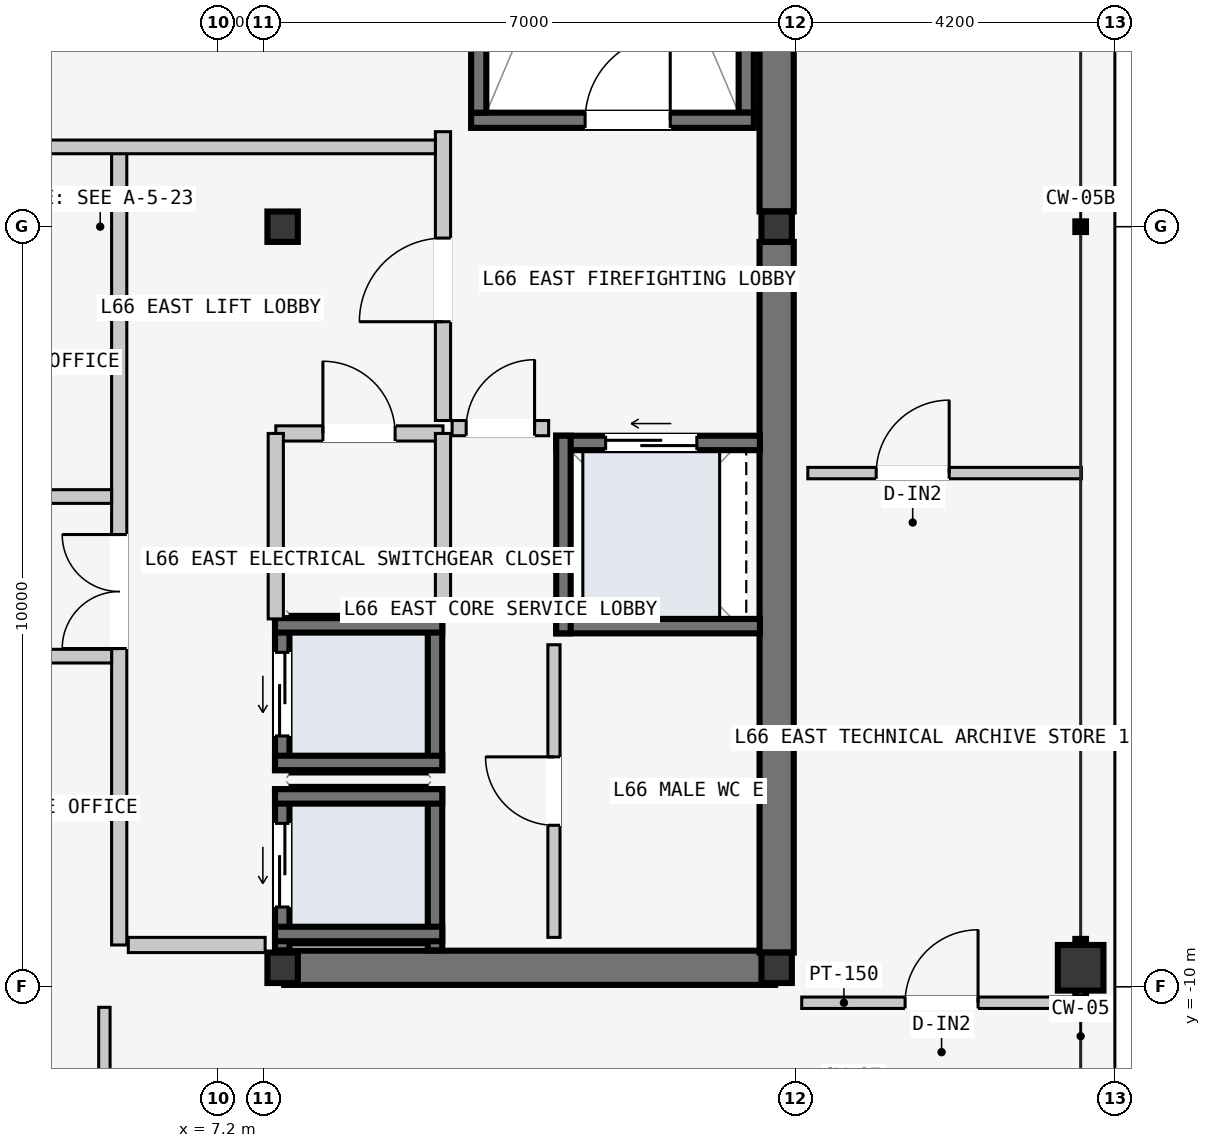
"""IFC4 building model, lengths in metres.
Left out: names, types, materials, properties, quantities, classifications, styles, units other than length and angle.
Written with IfcOpenShell. Run it as: python <this file> out.ifc"""

import sys

from ifc_helpers import new_model, si_unit, direction, frame, frame_2d, origin, origin_2d, place, context, subcontext, project, spatial, rectangle, hollow_rectangle, i_section, extrude, element, fill, save


model = new_model("IFC4")
c1 = context("Model", 3, precision=1e-05, world=origin(), true_north=direction((0.0, 1.0)))
c2 = subcontext(c1, "Body", "Model", "MODEL_VIEW")
j1 = project(units=[si_unit("LENGTHUNIT", "METRE"), si_unit("PLANEANGLEUNIT", "RADIAN")], contexts=[c1])
p1 = place(None, origin())
s1 = spatial("IfcSite", under=j1, at=p1, CompositionType="ELEMENT")
p2 = place(p1, origin())
s2 = spatial("IfcBuilding", under=s1, at=p2, CompositionType="ELEMENT")
p3 = place(p2, frame((0.0, 0.0, 250.8)))
s3 = spatial("IfcBuildingStorey", under=s2, at=p3, CompositionType="ELEMENT", Elevation=250.8)
p4 = place(p3, frame((8.07, -9.75, -0.2), z_axis=(0.0, 0.0, 1.0), x_axis=(1.0, 0.0, 0.0)))
e1 = element("IfcWall", 1, at=p4, inside=s3, PredefinedType="SHEAR", context=c2, shape_type="SweptSolid", body=[
    extrude(rectangle(XDim=6.46, YDim=0.45, at=frame_2d((3.23, 0.0))), origin(), (0.0, 0.0, 1.0), 3.6),
])
for number, where, z_axis, x_axis in (
    (2, (14.55, -9.55, -0.2), (0.0, 0.0, 1.0), (0.0, 1.0, 0.0)),
    (3, (14.55, 0.2, -0.2), (0.0, 0.0, 1.0), (0.0, 1.0, 0.0)),
):
    element("IfcWall", number, at=place(p3, frame(where, z_axis=z_axis, x_axis=x_axis)), inside=s3, PredefinedType="SHEAR", context=c2, shape_type="SweptSolid", body=[
        extrude(rectangle(XDim=9.35, YDim=0.45, at=frame_2d((4.675, 0.0))), origin(), (0.0, 0.0, 1.0), 3.6),
    ])
p5 = place(p3, frame((14.15, 1.5, -0.2), z_axis=(0.0, 0.0, 1.0), x_axis=(0.0, 1.0, 0.0)))
e4 = element("IfcWall", 4, at=p5, inside=s3, PredefinedType="SOLIDWALL", context=c2, shape_type="SweptSolid", body=[
    extrude(rectangle(XDim=7.8, YDim=0.2, at=frame_2d((3.9, 0.0))), origin(), (0.0, 0.0, 1.0), 3.6),
])
p6 = place(p3, frame((10.53, 1.4, -0.2), z_axis=(0.0, 0.0, 1.0), x_axis=(1.0, 0.0, 0.0)))
e5 = element("IfcWall", 5, at=p6, inside=s3, PredefinedType="SOLIDWALL", context=c2, shape_type="SweptSolid", body=[
    extrude(rectangle(XDim=3.72, YDim=0.2, at=frame_2d((1.86, 0.0))), origin(), (0.0, 0.0, 1.0), 3.6),
])
p7 = place(p6, frame((1.5, 0.0, 0.2)))
e6 = element("IfcOpeningElement", 6, at=p7, cuts=e5, PredefinedType="OPENING", context=c2, shape_type="SweptSolid", body=[
    extrude(rectangle(XDim=1.12, YDim=2.18, at=frame_2d((0.56, 1.09))), frame((0.0, 0.11, 0.0), z_axis=(0.0, -1.0, 0.0), x_axis=(1.0, 0.0, 0.0)), (0.0, 0.0, 1.0), 0.22),
])
p8 = place(p3, frame((10.63, 1.5, -0.2), z_axis=(0.0, 0.0, 1.0), x_axis=(0.0, 1.0, 0.0)))
e7 = element("IfcWall", 7, at=p8, inside=s3, PredefinedType="SOLIDWALL", context=c2, shape_type="SweptSolid", body=[
    extrude(rectangle(XDim=7.8, YDim=0.2, at=frame_2d((3.9, 0.0))), origin(), (0.0, 0.0, 1.0), 3.6),
])
for number, where, z_axis, x_axis in (
    (8, (8.05, -9.75, 0.0), (0.0, 0.0, 1.0), (1.0, 0.0, 0.0)),
    (9, (8.05, 0.0, 0.0), (0.0, 0.0, 1.0), (1.0, 0.0, 0.0)),
    (10, (14.55, -9.75, 0.0), (0.0, 0.0, 1.0), (1.0, 0.0, 0.0)),
    (11, (14.55, 0.0, 0.0), (0.0, 0.0, 1.0), (1.0, 0.0, 0.0)),
):
    element("IfcColumn", number, at=place(p3, frame(where, z_axis=z_axis, x_axis=x_axis)), inside=s3, PredefinedType="COLUMN", context=c2, shape_type="SweptSolid", body=[
        extrude(i_section(OverallWidth=0.4, OverallDepth=0.4, WebThickness=0.013, FlangeThickness=0.021, at=origin_2d()), origin(), (0.0, 0.0, 1.0), 3.6),
    ])
p9 = place(p3, frame((18.55, -9.75, 0.0), z_axis=(0.0, 0.0, 1.0), x_axis=(0.0, 1.0, 0.0)))
e12 = element("IfcColumn", 12, at=p9, inside=s3, PredefinedType="COLUMN", context=c2, shape_type="SweptSolid", body=[
    extrude(hollow_rectangle(XDim=0.6, YDim=0.6, WallThickness=0.025, at=origin_2d()), origin(), (0.0, 0.0, 1.0), 3.6),
])
p10 = place(p3, frame((8.045, -9.52, -0.2), z_axis=(0.0, 0.0, 1.0), x_axis=(0.0, 1.0, 0.0)))
e13 = element("IfcWall", 13, at=p10, inside=s3, PredefinedType="SOLIDWALL", context=c2, shape_type="SweptSolid", body=[
    extrude(rectangle(XDim=2.12, YDim=0.19, at=frame_2d((1.06, 0.0))), origin(), (0.0, 0.0, 1.0), 3.6),
])
p11 = place(p10, frame((0.57, 0.0, 0.2)))
e14 = element("IfcOpeningElement", 14, at=p11, cuts=e13, PredefinedType="OPENING", context=c2, shape_type="SweptSolid", body=[
    extrude(rectangle(XDim=1.1, YDim=2.2, at=frame_2d((0.55, 1.1))), frame((0.0, 0.105, 0.0), z_axis=(0.0, -1.0, 0.0), x_axis=(1.0, 0.0, 0.0)), (0.0, 0.0, 1.0), 0.21),
])
p12 = place(p3, frame((10.055, -9.52, -0.2), z_axis=(0.0, 0.0, 1.0), x_axis=(0.0, 1.0, 0.0)))
e15 = element("IfcWall", 15, at=p12, inside=s3, PredefinedType="SOLIDWALL", context=c2, shape_type="SweptSolid", body=[
    extrude(rectangle(XDim=2.12, YDim=0.19, at=frame_2d((1.06, 0.0))), origin(), (0.0, 0.0, 1.0), 3.6),
])
for number, where, z_axis, x_axis in (
    (16, (7.95, -7.495, -0.2), (0.0, 0.0, 1.0), (1.0, 0.0, 0.0)),
    (17, (7.95, -9.305, -0.2), (0.0, 0.0, 1.0), (1.0, 0.0, 0.0)),
):
    element("IfcWall", number, at=place(p3, frame(where, z_axis=z_axis, x_axis=x_axis)), inside=s3, PredefinedType="SOLIDWALL", context=c2, shape_type="SweptSolid", body=[
        extrude(rectangle(XDim=2.2, YDim=0.19, at=frame_2d((1.1, 0.0))), origin(), (0.0, 0.0, 1.0), 3.6),
    ])
p13 = place(p3, frame((8.045, -7.15, -0.2), z_axis=(0.0, 0.0, 1.0), x_axis=(0.0, 1.0, 0.0)))
e18 = element("IfcWall", 18, at=p13, inside=s3, PredefinedType="SOLIDWALL", context=c2, shape_type="SweptSolid", body=[
    extrude(rectangle(XDim=2.0, YDim=0.19, at=frame_2d((1.0, 0.0))), origin(), (0.0, 0.0, 1.0), 3.6),
])
p14 = place(p13, frame((0.45, 0.0, 0.2)))
e19 = element("IfcOpeningElement", 19, at=p14, cuts=e18, PredefinedType="OPENING", context=c2, shape_type="SweptSolid", body=[
    extrude(rectangle(XDim=1.1, YDim=2.2, at=frame_2d((0.55, 1.1))), frame((0.0, 0.105, 0.0), z_axis=(0.0, -1.0, 0.0), x_axis=(1.0, 0.0, 0.0)), (0.0, 0.0, 1.0), 0.21),
])
p15 = place(p3, frame((10.055, -7.15, -0.2), z_axis=(0.0, 0.0, 1.0), x_axis=(0.0, 1.0, 0.0)))
e20 = element("IfcWall", 20, at=p15, inside=s3, PredefinedType="SOLIDWALL", context=c2, shape_type="SweptSolid", body=[
    extrude(rectangle(XDim=2.0, YDim=0.19, at=frame_2d((1.0, 0.0))), origin(), (0.0, 0.0, 1.0), 3.6),
])
for number, where, z_axis, x_axis in (
    (21, (7.95, -5.245, -0.2), (0.0, 0.0, 1.0), (1.0, 0.0, 0.0)),
    (22, (7.95, -7.055, -0.2), (0.0, 0.0, 1.0), (1.0, 0.0, 0.0)),
):
    element("IfcWall", number, at=place(p3, frame(where, z_axis=z_axis, x_axis=x_axis)), inside=s3, PredefinedType="SOLIDWALL", context=c2, shape_type="SweptSolid", body=[
        extrude(rectangle(XDim=2.2, YDim=0.19, at=frame_2d((1.1, 0.0))), origin(), (0.0, 0.0, 1.0), 3.6),
    ])
p16 = place(p3, frame((11.65, -2.845, -0.2), z_axis=(0.0, 0.0, 1.0), x_axis=(1.0, 0.0, 0.0)))
e23 = element("IfcWall", 23, at=p16, inside=s3, PredefinedType="SOLIDWALL", context=c2, shape_type="SweptSolid", body=[
    extrude(rectangle(XDim=2.68, YDim=0.19, at=frame_2d((1.34, 0.0))), origin(), (0.0, 0.0, 1.0), 3.6),
])
p17 = place(p16, frame((0.65, 0.0, 0.2)))
e24 = element("IfcOpeningElement", 24, at=p17, cuts=e23, PredefinedType="OPENING", context=c2, shape_type="SweptSolid", body=[
    extrude(rectangle(XDim=1.2, YDim=2.2, at=frame_2d((0.6, 1.1))), frame((0.0, 0.105, 0.0), z_axis=(0.0, -1.0, 0.0), x_axis=(1.0, 0.0, 0.0)), (0.0, 0.0, 1.0), 0.21),
])
p18 = place(p3, frame((11.65, -5.255, -0.2), z_axis=(0.0, 0.0, 1.0), x_axis=(1.0, 0.0, 0.0)))
e25 = element("IfcWall", 25, at=p18, inside=s3, PredefinedType="SOLIDWALL", context=c2, shape_type="SweptSolid", body=[
    extrude(rectangle(XDim=2.68, YDim=0.19, at=frame_2d((1.34, 0.0))), origin(), (0.0, 0.0, 1.0), 3.6),
])
p19 = place(p3, frame((11.745, -5.35, -0.2), z_axis=(0.0, 0.0, 1.0), x_axis=(0.0, 1.0, 0.0)))
e26 = element("IfcWall", 26, at=p19, inside=s3, PredefinedType="SOLIDWALL", context=c2, shape_type="SweptSolid", body=[
    extrude(rectangle(XDim=2.6, YDim=0.19, at=frame_2d((1.3, 0.0))), origin(), (0.0, 0.0, 1.0), 3.6),
])
p20 = place(p3, frame((5.9, -9.45, 0.0), z_axis=(0.0, 0.0, 1.0), x_axis=(0.0, 1.0, 0.0)))
e27 = element("IfcWall", 27, at=p20, inside=s3, PredefinedType="PARTITIONING", context=c2, shape_type="SweptSolid", body=[
    extrude(rectangle(XDim=10.5, YDim=0.2, at=frame_2d((5.25, 0.0))), origin(), (0.0, 0.0, 1.0), 3.4),
])
p21 = place(p20, frame((3.9, 0.0, 0.0)))
e28 = element("IfcOpeningElement", 28, at=p21, cuts=e27, PredefinedType="OPENING", context=c2, shape_type="SweptSolid", body=[
    extrude(rectangle(XDim=1.5, YDim=2.2, at=frame_2d((0.75, 1.1))), frame((0.0, 0.11, 0.0), z_axis=(0.0, -1.0, 0.0), x_axis=(1.0, 0.0, 0.0)), (0.0, 0.0, 1.0), 0.22),
])
p22 = place(p3, frame((6.02, -9.45, 0.0), z_axis=(0.0, 0.0, 1.0), x_axis=(1.0, 0.0, 0.0)))
e29 = element("IfcWall", 29, at=p22, inside=s3, PredefinedType="PARTITIONING", context=c2, shape_type="SweptSolid", body=[
    extrude(rectangle(XDim=1.8, YDim=0.2, at=frame_2d((0.9, 0.0))), origin(), (0.0, 0.0, 1.0), 3.4),
])
p23 = place(p3, frame((10.16, -2.55, 0.0), z_axis=(0.0, 0.0, 1.0), x_axis=(0.0, 1.0, 0.0)))
e30 = element("IfcWall", 30, at=p23, inside=s3, PredefinedType="PARTITIONING", context=c2, shape_type="SweptSolid", body=[
    extrude(rectangle(XDim=3.8, YDim=0.2, at=frame_2d((1.9, 0.0))), origin(), (0.0, 0.0, 1.0), 3.4),
])
p24 = place(p23, frame((1.3, 0.0, 0.0)))
e31 = element("IfcOpeningElement", 31, at=p24, cuts=e30, PredefinedType="OPENING", context=c2, shape_type="SweptSolid", body=[
    extrude(rectangle(XDim=1.1, YDim=2.15, at=frame_2d((0.55, 1.075))), frame((0.0, 0.11, 0.0), z_axis=(0.0, -1.0, 0.0), x_axis=(1.0, 0.0, 0.0)), (0.0, 0.0, 1.0), 0.22),
])
p25 = place(p3, frame((10.28, -2.65, 0.0), z_axis=(0.0, 0.0, 1.0), x_axis=(1.0, 0.0, 0.0)))
e32 = element("IfcWall", 32, at=p25, inside=s3, PredefinedType="PARTITIONING", context=c2, shape_type="SweptSolid", body=[
    extrude(rectangle(XDim=1.27, YDim=0.2, at=frame_2d((0.635, 0.0))), origin(), (0.0, 0.0, 1.0), 3.4),
])
p26 = place(p25, frame((0.185, 0.0, 0.0)))
e33 = element("IfcOpeningElement", 33, at=p26, cuts=e32, PredefinedType="OPENING", context=c2, shape_type="SweptSolid", body=[
    extrude(rectangle(XDim=0.9, YDim=2.15, at=frame_2d((0.45, 1.075))), frame((0.0, 0.11, 0.0), z_axis=(0.0, -1.0, 0.0), x_axis=(1.0, 0.0, 0.0)), (0.0, 0.0, 1.0), 0.22),
])
p27 = place(p3, frame((7.96, -2.72, 0.0), z_axis=(0.0, 0.0, 1.0), x_axis=(1.0, 0.0, 0.0)))
e34 = element("IfcWall", 34, at=p27, inside=s3, PredefinedType="PARTITIONING", context=c2, shape_type="SweptSolid", body=[
    extrude(rectangle(XDim=2.2, YDim=0.2, at=frame_2d((1.1, 0.0))), origin(), (0.0, 0.0, 1.0), 3.4),
])
p28 = place(p27, frame((0.62, 0.0, 0.0)))
e35 = element("IfcOpeningElement", 35, at=p28, cuts=e34, PredefinedType="OPENING", context=c2, shape_type="SweptSolid", body=[
    extrude(rectangle(XDim=0.95, YDim=2.1, at=frame_2d((0.475, 1.05))), frame((0.0, 0.11, 0.0), z_axis=(0.0, -1.0, 0.0), x_axis=(1.0, 0.0, 0.0)), (0.0, 0.0, 1.0), 0.22),
])
for number, where, z_axis, x_axis in (
    (36, (7.96, -5.16, 0.0), (0.0, 0.0, 1.0), (0.0, 1.0, 0.0)),
    (37, (10.16, -5.16, 0.0), (0.0, 0.0, 1.0), (0.0, 1.0, 0.0)),
):
    element("IfcWall", number, at=place(p3, frame(where, z_axis=z_axis, x_axis=x_axis)), inside=s3, PredefinedType="PARTITIONING", context=c2, shape_type="SweptSolid", body=[
        extrude(rectangle(XDim=2.44, YDim=0.2, at=frame_2d((1.22, 0.0))), origin(), (0.0, 0.0, 1.0), 3.4),
    ])
p29 = place(p3, frame((11.62, -9.35, 0.0), z_axis=(0.0, 0.0, 1.0), x_axis=(0.0, 1.0, 0.0)))
e38 = element("IfcWall", 38, at=p29, inside=s3, PredefinedType="PARTITIONING", context=c2, shape_type="SweptSolid", body=[
    extrude(rectangle(XDim=3.85, YDim=0.16, at=frame_2d((1.925, 0.0))), origin(), (0.0, 0.0, 1.0), 3.4),
])
p30 = place(p29, frame((1.475, 0.0, 0.0)))
e39 = element("IfcOpeningElement", 39, at=p30, cuts=e38, PredefinedType="OPENING", context=c2, shape_type="SweptSolid", body=[
    extrude(rectangle(XDim=0.9, YDim=2.15, at=frame_2d((0.45, 1.075))), frame((0.0, 0.09, 0.0), z_axis=(0.0, -1.0, 0.0), x_axis=(1.0, 0.0, 0.0)), (0.0, 0.0, 1.0), 0.18),
])
p31 = place(p3, frame((1.26, 1.05, 0.0), z_axis=(0.0, 0.0, 1.0), x_axis=(1.0, 0.0, 0.0)))
e40 = element("IfcWall", 40, at=p31, inside=s3, PredefinedType="PARTITIONING", context=c2, shape_type="SweptSolid", body=[
    extrude(rectangle(XDim=8.8, YDim=0.18, at=frame_2d((4.4, 0.0))), origin(), (0.0, 0.0, 1.0), 3.4),
])
for number, where, z_axis, x_axis in (
    (41, (1.26, -3.55, 0.0), (0.0, 0.0, 1.0), (1.0, 0.0, 0.0)),
    (42, (1.26, -5.65, 0.0), (0.0, 0.0, 1.0), (1.0, 0.0, 0.0)),
):
    element("IfcWall", number, at=place(p3, frame(where, z_axis=z_axis, x_axis=x_axis)), inside=s3, PredefinedType="PARTITIONING", context=c2, shape_type="SweptSolid", body=[
        extrude(rectangle(XDim=4.54, YDim=0.18, at=frame_2d((2.27, 0.0))), origin(), (0.0, 0.0, 1.0), 3.4),
    ])
p32 = place(p3, frame((5.705, -17.56, 0.0), z_axis=(0.0, 0.0, 1.0), x_axis=(0.0, 1.0, 0.0)))
e43 = element("IfcWall", 43, at=p32, inside=s3, PredefinedType="PARTITIONING", context=c2, shape_type="SweptSolid", body=[
    extrude(rectangle(XDim=7.29, YDim=0.15, at=frame_2d((3.645, 0.0))), origin(), (0.0, 0.0, 1.0), 3.4),
])
p33 = place(p32, frame((1.05, 0.0, 0.0)))
e44 = element("IfcOpeningElement", 44, at=p33, cuts=e43, PredefinedType="OPENING", context=c2, shape_type="SweptSolid", body=[
    extrude(rectangle(XDim=0.96, YDim=2.18, at=frame_2d((0.48, 1.09))), frame((0.0, 0.085, 0.0), z_axis=(0.0, -1.0, 0.0), x_axis=(1.0, 0.0, 0.0)), (0.0, 0.0, 1.0), 0.17),
])
p34 = place(p3, frame((14.88, -10.21, 0.0), z_axis=(0.0, 0.0, 1.0), x_axis=(1.0, 0.0, 0.0)))
e45 = element("IfcWall", 45, at=p34, inside=s3, PredefinedType="PARTITIONING", context=c2, shape_type="SweptSolid", body=[
    extrude(rectangle(XDim=3.68, YDim=0.15, at=frame_2d((1.84, 0.0))), origin(), (0.0, 0.0, 1.0), 3.4),
])
p35 = place(p34, frame((1.36, 0.0, 0.0)))
e46 = element("IfcOpeningElement", 46, at=p35, cuts=e45, PredefinedType="OPENING", context=c2, shape_type="SweptSolid", body=[
    extrude(rectangle(XDim=0.96, YDim=2.18, at=frame_2d((0.48, 1.09))), frame((0.0, 0.085, 0.0), z_axis=(0.0, -1.0, 0.0), x_axis=(1.0, 0.0, 0.0)), (0.0, 0.0, 1.0), 0.17),
])
p36 = place(p3, frame((14.96, -3.242, 0.0), z_axis=(0.0, 0.0, 1.0), x_axis=(1.0, 0.0, 0.0)))
e47 = element("IfcWall", 47, at=p36, inside=s3, PredefinedType="PARTITIONING", context=c2, shape_type="SweptSolid", body=[
    extrude(rectangle(XDim=3.6, YDim=0.15, at=frame_2d((1.8, 0.0))), origin(), (0.0, 0.0, 1.0), 3.05),
])
p37 = place(p36, frame((0.9, 0.0, 0.0)))
e48 = element("IfcOpeningElement", 48, at=p37, cuts=e47, PredefinedType="OPENING", context=c2, shape_type="SweptSolid", body=[
    extrude(rectangle(XDim=0.96, YDim=2.18, at=frame_2d((0.48, 1.09))), frame((0.0, 0.085, 0.0), z_axis=(0.0, -1.0, 0.0), x_axis=(1.0, 0.0, 0.0)), (0.0, 0.0, 1.0), 0.17),
])
p38 = place(p7, origin())
e49 = element("IfcDoor", 49, at=p38, inside=s3, OperationType="SINGLE_SWING_RIGHT", PredefinedType="DOOR", context=c2, shape_type="SweptSolid", body=[
    extrude(rectangle(XDim=1.12, YDim=2.18, at=frame_2d((0.56, 1.09))), frame((0.0, 0.025, 0.0), z_axis=(0.0, -1.0, 0.0), x_axis=(1.0, 0.0, 0.0)), (0.0, 0.0, 1.0), 0.05),
])
fill(e6, e49)
p39 = place(p11, origin())
e50 = element("IfcDoor", 50, at=p39, inside=s3, OperationType="SLIDING_TO_LEFT", PredefinedType="DOOR", context=c2, shape_type="SweptSolid", body=[
    extrude(rectangle(XDim=1.1, YDim=2.2, at=frame_2d((0.55, 1.1))), frame((0.0, 0.025, 0.0), z_axis=(0.0, -1.0, 0.0), x_axis=(1.0, 0.0, 0.0)), (0.0, 0.0, 1.0), 0.05),
])
fill(e14, e50)
p40 = place(p14, origin())
e51 = element("IfcDoor", 51, at=p40, inside=s3, OperationType="SLIDING_TO_LEFT", PredefinedType="DOOR", context=c2, shape_type="SweptSolid", body=[
    extrude(rectangle(XDim=1.1, YDim=2.2, at=frame_2d((0.55, 1.1))), frame((0.0, 0.025, 0.0), z_axis=(0.0, -1.0, 0.0), x_axis=(1.0, 0.0, 0.0)), (0.0, 0.0, 1.0), 0.05),
])
fill(e19, e51)
p41 = place(p17, origin())
e52 = element("IfcDoor", 52, at=p41, inside=s3, OperationType="SLIDING_TO_LEFT", PredefinedType="DOOR", context=c2, shape_type="SweptSolid", body=[
    extrude(rectangle(XDim=1.2, YDim=2.2, at=frame_2d((0.6, 1.1))), frame((0.0, 0.025, 0.0), z_axis=(0.0, -1.0, 0.0), x_axis=(1.0, 0.0, 0.0)), (0.0, 0.0, 1.0), 0.05),
])
fill(e24, e52)
p42 = place(p21, origin())
e53 = element("IfcDoor", 53, at=p42, inside=s3, OperationType="DOUBLE_DOOR_SINGLE_SWING", PredefinedType="DOOR", context=c2, shape_type="SweptSolid", body=[
    extrude(rectangle(XDim=1.5, YDim=2.2, at=frame_2d((0.75, 1.1))), frame((0.0, 0.025, 0.0), z_axis=(0.0, -1.0, 0.0), x_axis=(1.0, 0.0, 0.0)), (0.0, 0.0, 1.0), 0.05),
])
fill(e28, e53)
p43 = place(p24, origin())
e54 = element("IfcDoor", 54, at=p43, inside=s3, OperationType="SINGLE_SWING_LEFT", PredefinedType="DOOR", context=c2, shape_type="SweptSolid", body=[
    extrude(rectangle(XDim=1.1, YDim=2.15, at=frame_2d((0.55, 1.075))), frame((0.0, 0.025, 0.0), z_axis=(0.0, -1.0, 0.0), x_axis=(1.0, 0.0, 0.0)), (0.0, 0.0, 1.0), 0.05),
])
fill(e31, e54)
p44 = place(p26, origin())
e55 = element("IfcDoor", 55, at=p44, inside=s3, OperationType="SINGLE_SWING_RIGHT", PredefinedType="DOOR", context=c2, shape_type="SweptSolid", body=[
    extrude(rectangle(XDim=0.9, YDim=2.15, at=frame_2d((0.45, 1.075))), frame((0.0, 0.025, 0.0), z_axis=(0.0, -1.0, 0.0), x_axis=(1.0, 0.0, 0.0)), (0.0, 0.0, 1.0), 0.05),
])
fill(e33, e55)
p45 = place(p28, origin())
e56 = element("IfcDoor", 56, at=p45, inside=s3, OperationType="SINGLE_SWING_LEFT", PredefinedType="DOOR", context=c2, shape_type="SweptSolid", body=[
    extrude(rectangle(XDim=0.95, YDim=2.1, at=frame_2d((0.475, 1.05))), frame((0.0, 0.025, 0.0), z_axis=(0.0, -1.0, 0.0), x_axis=(1.0, 0.0, 0.0)), (0.0, 0.0, 1.0), 0.05),
])
fill(e35, e56)
p46 = place(p30, origin())
e57 = element("IfcDoor", 57, at=p46, inside=s3, OperationType="SINGLE_SWING_RIGHT", PredefinedType="DOOR", context=c2, shape_type="SweptSolid", body=[
    extrude(rectangle(XDim=0.9, YDim=2.15, at=frame_2d((0.45, 1.075))), frame((0.0, 0.025, 0.0), z_axis=(0.0, -1.0, 0.0), x_axis=(1.0, 0.0, 0.0)), (0.0, 0.0, 1.0), 0.05),
])
fill(e39, e57)
p47 = place(p35, origin())
e58 = element("IfcDoor", 58, at=p47, inside=s3, OperationType="SINGLE_SWING_RIGHT", PredefinedType="DOOR", context=c2, shape_type="SweptSolid", body=[
    extrude(rectangle(XDim=0.96, YDim=2.18, at=frame_2d((0.48, 1.09))), frame((0.0, 0.025, 0.0), z_axis=(0.0, -1.0, 0.0), x_axis=(1.0, 0.0, 0.0)), (0.0, 0.0, 1.0), 0.05),
])
fill(e46, e58)
p48 = place(p37, origin())
e59 = element("IfcDoor", 59, at=p48, inside=s3, OperationType="SINGLE_SWING_RIGHT", PredefinedType="DOOR", context=c2, shape_type="SweptSolid", body=[
    extrude(rectangle(XDim=0.96, YDim=2.18, at=frame_2d((0.48, 1.09))), frame((0.0, 0.025, 0.0), z_axis=(0.0, -1.0, 0.0), x_axis=(1.0, 0.0, 0.0)), (0.0, 0.0, 1.0), 0.05),
])
fill(e48, e59)
save(model, sys.argv[1])
